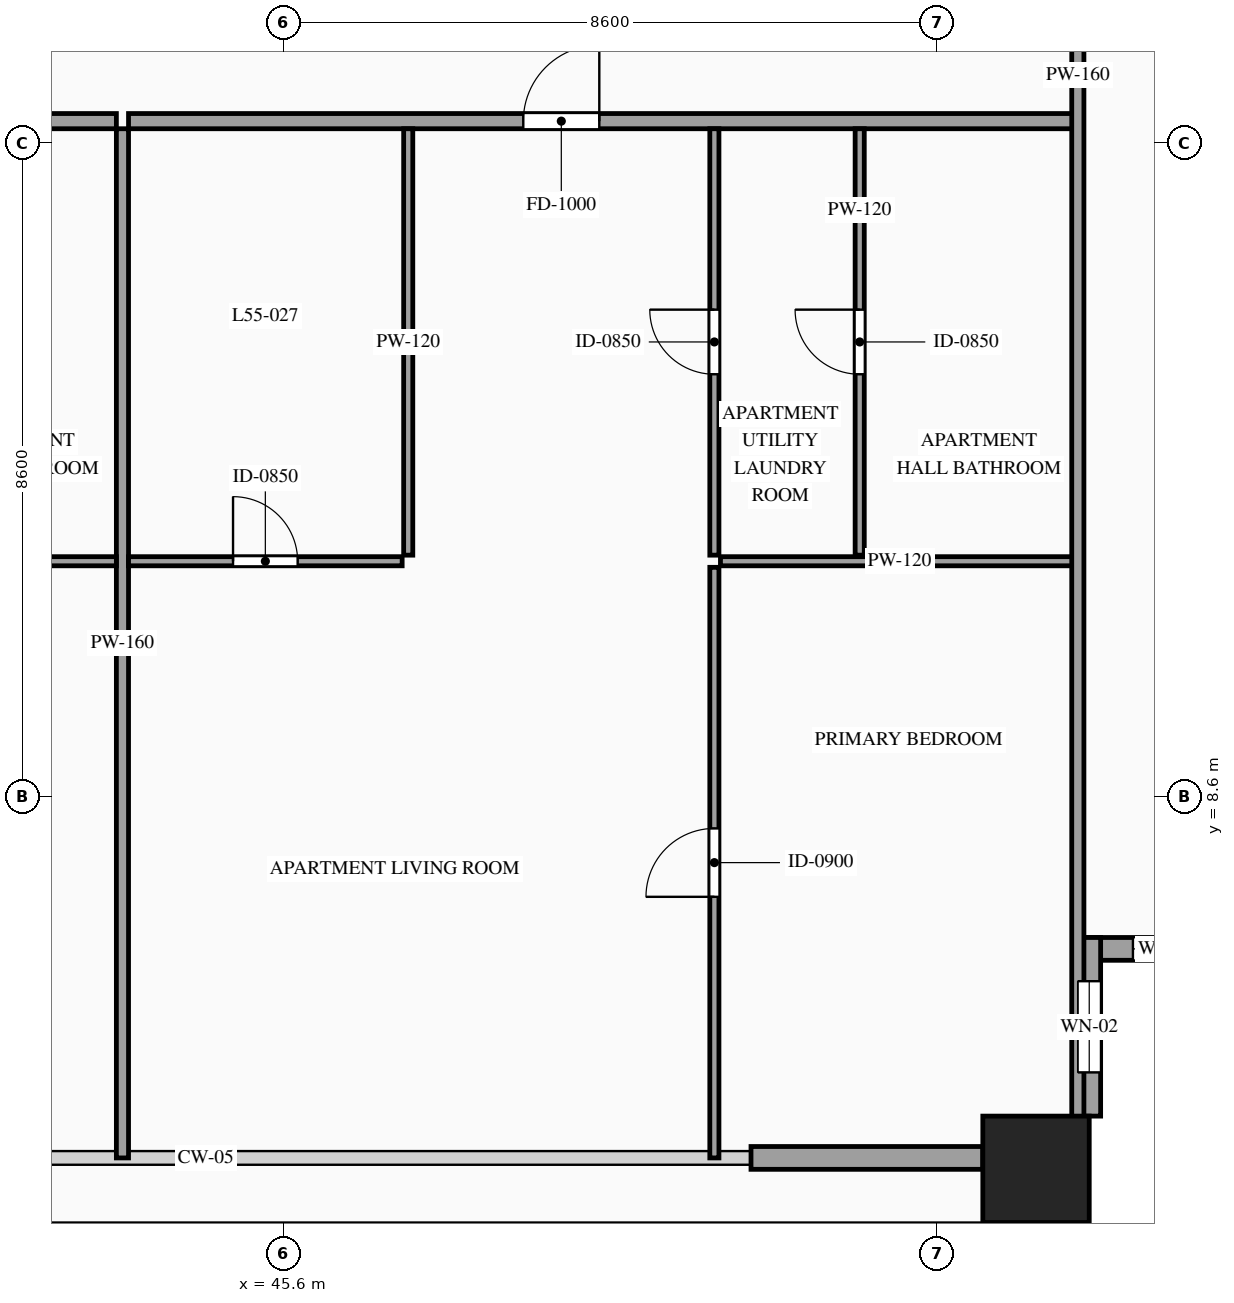
"""IFC4 building model, lengths in metres.
Left out: names, types, materials, properties, quantities, classifications, styles, units other than length and angle.
Written with IfcOpenShell. Run it as: python <this file> out.ifc"""

import sys

from ifc_helpers import new_model, si_unit, direction, frame, frame_2d, origin, origin_2d, place, context, subcontext, project, spatial, rectangle, hollow_rectangle, extrude, source, transform, mapped, element, fill, save


model = new_model("IFC4")
c1 = context("Model", 3, precision=1e-05, world=origin(), true_north=direction((0.0, 1.0)))
c2 = subcontext(c1, "Body", "Model", "MODEL_VIEW")
j1 = project(units=[si_unit("LENGTHUNIT", "METRE"), si_unit("PLANEANGLEUNIT", "RADIAN")], contexts=[c1])
p1 = place(None, origin())
s1 = spatial("IfcSite", under=j1, at=p1, CompositionType="ELEMENT")
p2 = place(p1, origin())
s2 = spatial("IfcBuilding", under=s1, at=p2, CompositionType="ELEMENT")
p3 = place(p2, frame((0.0, 0.0, 209.0)))
s3 = spatial("IfcBuildingStorey", under=s2, at=p3, CompositionType="ELEMENT", Elevation=209.0)
m1 = source(origin(), c2, "Body", "SweptSolid", [
    extrude(hollow_rectangle(XDim=1.4, YDim=1.4, WallThickness=0.06, at=origin_2d()), origin(), (0.0, 0.0, 1.0), 3.5),
])
p4 = place(p3, frame((55.5, 3.7, 0.0), z_axis=(0.0, 0.0, 1.0), x_axis=(1.0, 0.0, 0.0)))
e1 = element("IfcColumn", 1, at=p4, inside=s3, PredefinedType="COLUMN", context=c2, shape_type="MappedRepresentation", body=[
    mapped(m1, transform((0.0, 0.0, 0.0), scale=1.0)),
])
p5 = place(p3, frame((56.05, 6.6, 0.0), z_axis=(0.0, 0.0, 1.0), x_axis=(1.0, 0.0, 0.0)))
e2 = element("IfcWall", 2, at=p5, inside=s3, PredefinedType="SOLIDWALL", context=c2, shape_type="SweptSolid", body=[
    extrude(rectangle(XDim=2.35, YDim=0.3, at=frame_2d((1.175, 0.0))), origin(), (0.0, 0.0, 1.0), 3.28),
])
p6 = place(p5, frame((0.725, 0.0, 0.85)))
e3 = element("IfcOpeningElement", 3, at=p6, cuts=e2, PredefinedType="OPENING", context=c2, shape_type="SweptSolid", body=[
    extrude(rectangle(XDim=0.9, YDim=1.5, at=frame_2d((0.45, 0.75))), frame((0.0, 0.165, 0.0), z_axis=(0.0, -1.0, 0.0), x_axis=(1.0, 0.0, 0.0)), (0.0, 0.0, 1.0), 0.33),
])
p7 = place(p3, frame((56.2, 4.4, 0.0), z_axis=(0.0, 0.0, 1.0), x_axis=(0.0, 1.0, 0.0)))
e4 = element("IfcWall", 4, at=p7, inside=s3, PredefinedType="SOLIDWALL", context=c2, shape_type="SweptSolid", body=[
    extrude(rectangle(XDim=2.35, YDim=0.3, at=frame_2d((1.175, 0.0))), origin(), (0.0, 0.0, 1.0), 3.28),
])
p8 = place(p7, frame((0.575, 0.0, 0.85)))
e5 = element("IfcOpeningElement", 5, at=p8, cuts=e4, PredefinedType="OPENING", context=c2, shape_type="SweptSolid", body=[
    extrude(rectangle(XDim=1.2, YDim=2.1, at=frame_2d((0.6, 1.05))), frame((0.0, 0.165, 0.0), z_axis=(0.0, -1.0, 0.0), x_axis=(1.0, 0.0, 0.0)), (0.0, 0.0, 1.0), 0.33),
])
m2 = source(origin(), c2, "Body", "SweptSolid", [
    extrude(rectangle(XDim=3.05, YDim=0.3, at=frame_2d((1.525, 0.0))), origin(), (0.0, 0.0, 1.0), 2.835),
])
p9 = place(p3, frame((51.75, 3.85, 0.0), z_axis=(0.0, 0.0, 1.0), x_axis=(1.0, 0.0, 0.0)))
e6 = element("IfcWall", 6, at=p9, inside=s3, PredefinedType="SOLIDWALL", context=c2, shape_type="MappedRepresentation", body=[
    mapped(m2, transform((0.0, 0.0, 0.0), scale=1.0)),
])
p10 = place(p3, frame((30.6, 17.49, 0.0), z_axis=(0.0, 0.0, 1.0), x_axis=(1.0, 0.0, 0.0)))
e7 = element("IfcWall", 7, at=p10, inside=s3, PredefinedType="PARTITIONING", context=c2, shape_type="SweptSolid", body=[
    extrude(rectangle(XDim=12.8, YDim=0.2, at=frame_2d((6.4, 0.0))), origin(), (0.0, 0.0, 1.0), 3.28),
])
p11 = place(p10, frame((5.344, 0.0, 0.0)))
e8 = element("IfcOpeningElement", 8, at=p11, cuts=e7, PredefinedType="OPENING", context=c2, shape_type="SweptSolid", body=[
    extrude(rectangle(XDim=1.0, YDim=2.2, at=frame_2d((0.5, 1.1))), frame((0.0, 0.115, 0.0), z_axis=(0.0, -1.0, 0.0), x_axis=(1.0, 0.0, 0.0)), (0.0, 0.0, 1.0), 0.23),
])
m3 = source(origin(), c2, "Body", "SweptSolid", [
    extrude(rectangle(XDim=13.54, YDim=0.16, at=frame_2d((6.77, 0.0))), origin(), (0.0, 0.0, 1.0), 3.28),
])
p12 = place(p3, frame((43.48, 3.85, 0.0), z_axis=(0.0, 0.0, 1.0), x_axis=(0.0, 1.0, 0.0)))
e9 = element("IfcWall", 9, at=p12, inside=s3, PredefinedType="PARTITIONING", context=c2, shape_type="MappedRepresentation", body=[
    mapped(m3, transform((0.0, 0.0, 0.0), scale=1.0)),
])
m4 = source(origin(), c2, "Body", "SweptSolid", [
    extrude(rectangle(XDim=4.712, YDim=0.12, at=frame_2d((2.356, 0.0))), origin(), (0.0, 0.0, 1.0), 2.875),
])
p13 = place(p3, frame((38.688, 11.7, 0.0), z_axis=(0.0, 0.0, 1.0), x_axis=(1.0, 0.0, 0.0)))
e10 = element("IfcWall", 10, at=p13, inside=s3, PredefinedType="PARTITIONING", context=c2, shape_type="MappedRepresentation", body=[
    mapped(m4, transform((0.0, 0.0, 0.0), scale=1.0)),
])
p14 = place(p3, frame((43.56, 17.49, 0.0), z_axis=(0.0, 0.0, 1.0), x_axis=(1.0, 0.0, 0.0)))
e11 = element("IfcWall", 11, at=p14, inside=s3, PredefinedType="PARTITIONING", context=c2, shape_type="SweptSolid", body=[
    extrude(rectangle(XDim=12.5, YDim=0.2, at=frame_2d((6.25, 0.0))), origin(), (0.0, 0.0, 1.0), 3.28),
])
p15 = place(p14, frame((5.194, 0.0, 0.0)))
e12 = element("IfcOpeningElement", 12, at=p15, cuts=e11, PredefinedType="OPENING", context=c2, shape_type="SweptSolid", body=[
    extrude(rectangle(XDim=1.0, YDim=2.2, at=frame_2d((0.5, 1.1))), frame((0.0, 0.115, 0.0), z_axis=(0.0, -1.0, 0.0), x_axis=(1.0, 0.0, 0.0)), (0.0, 0.0, 1.0), 0.23),
])
p16 = place(p3, frame((43.56, 11.7, 0.0), z_axis=(0.0, 0.0, 1.0), x_axis=(1.0, 0.0, 0.0)))
e13 = element("IfcWall", 13, at=p16, inside=s3, PredefinedType="PARTITIONING", context=c2, shape_type="SweptSolid", body=[
    extrude(rectangle(XDim=3.6, YDim=0.12, at=frame_2d((1.8, 0.0))), origin(), (0.0, 0.0, 1.0), 2.875),
])
p17 = place(p16, frame((1.375, 0.0, 0.0)))
e14 = element("IfcOpeningElement", 14, at=p17, cuts=e13, PredefinedType="OPENING", context=c2, shape_type="SweptSolid", body=[
    extrude(rectangle(XDim=0.85, YDim=2.1, at=frame_2d((0.425, 1.05))), frame((0.0, 0.075, 0.0), z_axis=(0.0, -1.0, 0.0), x_axis=(1.0, 0.0, 0.0)), (0.0, 0.0, 1.0), 0.15),
])
m5 = source(origin(), c2, "Body", "SweptSolid", [
    extrude(rectangle(XDim=5.61, YDim=0.12, at=frame_2d((2.805, 0.0))), origin(), (0.0, 0.0, 1.0), 3.28),
])
p18 = place(p3, frame((47.24, 11.78, 0.0), z_axis=(0.0, 0.0, 1.0), x_axis=(0.0, 1.0, 0.0)))
e15 = element("IfcWall", 15, at=p18, inside=s3, PredefinedType="PARTITIONING", context=c2, shape_type="MappedRepresentation", body=[
    mapped(m5, transform((0.0, 0.0, 0.0), scale=1.0)),
])
p19 = place(p3, frame((53.18, 11.78, 0.0), z_axis=(0.0, 0.0, 1.0), x_axis=(0.0, 1.0, 0.0)))
e16 = element("IfcWall", 16, at=p19, inside=s3, PredefinedType="PARTITIONING", context=c2, shape_type="SweptSolid", body=[
    extrude(rectangle(XDim=5.61, YDim=0.12, at=frame_2d((2.805, 0.0))), origin(), (0.0, 0.0, 1.0), 3.28),
])
p20 = place(p19, frame((2.38, 0.0, 0.0)))
e17 = element("IfcOpeningElement", 17, at=p20, cuts=e16, PredefinedType="OPENING", context=c2, shape_type="SweptSolid", body=[
    extrude(rectangle(XDim=0.85, YDim=2.1, at=frame_2d((0.425, 1.05))), frame((0.0, 0.075, 0.0), z_axis=(0.0, -1.0, 0.0), x_axis=(1.0, 0.0, 0.0)), (0.0, 0.0, 1.0), 0.15),
])
m6 = source(origin(), c2, "Body", "SweptSolid", [
    extrude(rectangle(XDim=4.712, YDim=0.12, at=frame_2d((2.356, 0.0))), origin(), (0.0, 0.0, 1.0), 3.28),
])
p21 = place(p3, frame((51.348, 11.7, 0.0), z_axis=(0.0, 0.0, 1.0), x_axis=(1.0, 0.0, 0.0)))
e18 = element("IfcWall", 18, at=p21, inside=s3, PredefinedType="PARTITIONING", context=c2, shape_type="MappedRepresentation", body=[
    mapped(m6, transform((0.0, 0.0, 0.0), scale=1.0)),
])
p22 = place(p3, frame((51.268, 3.85, 0.0), z_axis=(0.0, 0.0, 1.0), x_axis=(0.0, 1.0, 0.0)))
e19 = element("IfcWall", 19, at=p22, inside=s3, PredefinedType="PARTITIONING", context=c2, shape_type="SweptSolid", body=[
    extrude(rectangle(XDim=7.77, YDim=0.12, at=frame_2d((3.885, 0.0))), origin(), (0.0, 0.0, 1.0), 3.28),
])
p23 = place(p22, frame((3.435, 0.0, 0.0)))
e20 = element("IfcOpeningElement", 20, at=p23, cuts=e19, PredefinedType="OPENING", context=c2, shape_type="SweptSolid", body=[
    extrude(rectangle(XDim=0.9, YDim=2.15, at=frame_2d((0.45, 1.075))), frame((0.0, 0.075, 0.0), z_axis=(0.0, -1.0, 0.0), x_axis=(1.0, 0.0, 0.0)), (0.0, 0.0, 1.0), 0.15),
])
p24 = place(p3, frame((51.268, 11.78, 0.0), z_axis=(0.0, 0.0, 1.0), x_axis=(0.0, 1.0, 0.0)))
e21 = element("IfcWall", 21, at=p24, inside=s3, PredefinedType="PARTITIONING", context=c2, shape_type="SweptSolid", body=[
    extrude(rectangle(XDim=5.61, YDim=0.12, at=frame_2d((2.805, 0.0))), origin(), (0.0, 0.0, 1.0), 3.28),
])
p25 = place(p24, frame((2.38, 0.0, 0.0)))
e22 = element("IfcOpeningElement", 22, at=p25, cuts=e21, PredefinedType="OPENING", context=c2, shape_type="SweptSolid", body=[
    extrude(rectangle(XDim=0.85, YDim=2.1, at=frame_2d((0.425, 1.05))), frame((0.0, 0.075, 0.0), z_axis=(0.0, -1.0, 0.0), x_axis=(1.0, 0.0, 0.0)), (0.0, 0.0, 1.0), 0.15),
])
m7 = source(origin(), c2, "Body", "SweptSolid", [
    extrude(rectangle(XDim=28.19, YDim=0.16, at=frame_2d((14.095, 0.0))), origin(), (0.0, 0.0, 1.0), 3.28),
])
p26 = place(p3, frame((56.05, 4.0, 0.0), z_axis=(0.0, 0.0, 1.0), x_axis=(0.0, 1.0, 0.0)))
e23 = element("IfcWall", 23, at=p26, inside=s3, PredefinedType="PARTITIONING", context=c2, shape_type="MappedRepresentation", body=[
    mapped(m7, transform((0.0, 0.0, 0.0), scale=1.0)),
])
m8 = source(origin(), c2, "Body", "SweptSolid", [
    extrude(rectangle(XDim=0.9, YDim=1.5, at=frame_2d((0.45, 0.75))), frame((0.0, 0.03, 0.0), z_axis=(0.0, -1.0, 0.0), x_axis=(1.0, 0.0, 0.0)), (0.0, 0.0, 1.0), 0.06),
])
p27 = place(p6, origin())
e24 = element("IfcWindow", 24, at=p27, inside=s3, PartitioningType="SINGLE_PANEL", PredefinedType="WINDOW", context=c2, shape_type="MappedRepresentation", body=[
    mapped(m8, transform((0.0, 0.0, 0.0), scale=1.0)),
])
fill(e3, e24)
m9 = source(origin(), c2, "Body", "SweptSolid", [
    extrude(rectangle(XDim=1.2, YDim=2.1, at=frame_2d((0.6, 1.05))), frame((0.0, 0.03, 0.0), z_axis=(0.0, -1.0, 0.0), x_axis=(1.0, 0.0, 0.0)), (0.0, 0.0, 1.0), 0.06),
])
p28 = place(p8, origin())
e25 = element("IfcWindow", 25, at=p28, inside=s3, PartitioningType="SINGLE_PANEL", PredefinedType="WINDOW", context=c2, shape_type="MappedRepresentation", body=[
    mapped(m9, transform((0.0, 0.0, 0.0), scale=1.0)),
])
fill(e5, e25)
m10 = source(origin(), c2, "Body", "SweptSolid", [
    extrude(rectangle(XDim=1.0, YDim=2.2, at=frame_2d((0.5, 1.1))), frame((0.0, 0.025, 0.0), z_axis=(0.0, -1.0, 0.0), x_axis=(1.0, 0.0, 0.0)), (0.0, 0.0, 1.0), 0.05),
])
p29 = place(p15, origin())
e26 = element("IfcDoor", 26, at=p29, inside=s3, OperationType="SINGLE_SWING_RIGHT", PredefinedType="DOOR", context=c2, shape_type="MappedRepresentation", body=[
    mapped(m10, transform((0.0, 0.0, 0.0), scale=1.0)),
])
fill(e12, e26)
m11 = source(origin(), c2, "Body", "SweptSolid", [
    extrude(rectangle(XDim=0.85, YDim=2.1, at=frame_2d((0.425, 1.05))), frame((0.0, 0.025, 0.0), z_axis=(0.0, -1.0, 0.0), x_axis=(1.0, 0.0, 0.0)), (0.0, 0.0, 1.0), 0.05),
])
p30 = place(p17, origin())
e27 = element("IfcDoor", 27, at=p30, inside=s3, OperationType="SINGLE_SWING_LEFT", PredefinedType="DOOR", context=c2, shape_type="MappedRepresentation", body=[
    mapped(m11, transform((0.0, 0.0, 0.0), scale=1.0)),
])
fill(e14, e27)
p31 = place(p20, origin())
e28 = element("IfcDoor", 28, at=p31, inside=s3, OperationType="SINGLE_SWING_RIGHT", PredefinedType="DOOR", context=c2, shape_type="MappedRepresentation", body=[
    mapped(m11, transform((0.0, 0.0, 0.0), scale=1.0)),
])
fill(e17, e28)
m12 = source(origin(), c2, "Body", "SweptSolid", [
    extrude(rectangle(XDim=0.9, YDim=2.15, at=frame_2d((0.45, 1.075))), frame((0.0, 0.025, 0.0), z_axis=(0.0, -1.0, 0.0), x_axis=(1.0, 0.0, 0.0)), (0.0, 0.0, 1.0), 0.05),
])
p32 = place(p23, origin())
e29 = element("IfcDoor", 29, at=p32, inside=s3, OperationType="SINGLE_SWING_LEFT", PredefinedType="DOOR", context=c2, shape_type="MappedRepresentation", body=[
    mapped(m12, transform((0.0, 0.0, 0.0), scale=1.0)),
])
fill(e20, e29)
p33 = place(p25, origin())
e30 = element("IfcDoor", 30, at=p33, inside=s3, OperationType="SINGLE_SWING_RIGHT", PredefinedType="DOOR", context=c2, shape_type="MappedRepresentation", body=[
    mapped(m11, transform((0.0, 0.0, 0.0), scale=1.0)),
])
fill(e22, e30)
save(model, sys.argv[1])
